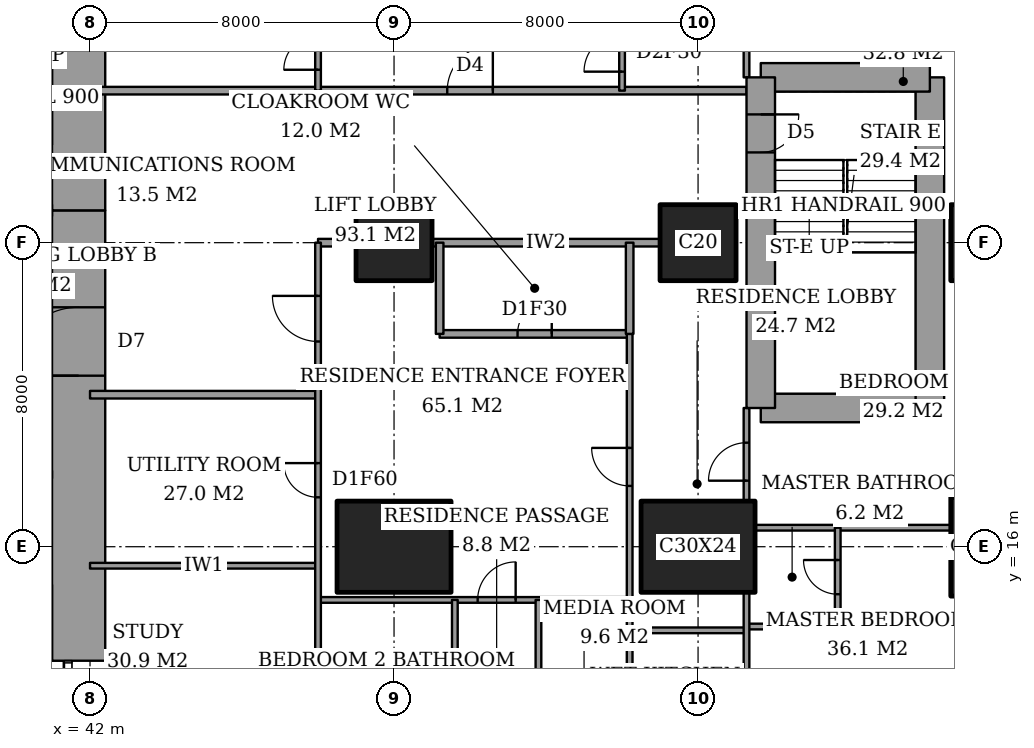
"""IFC4 building model, lengths in metres.
Left out: names, types, materials, properties, quantities, classifications, styles, units other than length and angle.
Written with IfcOpenShell. Run it as: python <this file> out.ifc"""

import sys

from ifc_helpers import new_model, si_unit, direction, frame, frame_2d, origin, origin_2d, place, context, subcontext, project, spatial, rectangle, extrude, element, fill, save


model = new_model("IFC4")
c1 = context("Model", 3, precision=1e-05, world=origin(), true_north=direction((0.0, 1.0)))
c2 = subcontext(c1, "Body", "Model", "MODEL_VIEW")
j1 = project(units=[si_unit("LENGTHUNIT", "METRE"), si_unit("PLANEANGLEUNIT", "RADIAN")], contexts=[c1])
p1 = place(None, origin())
s1 = spatial("IfcSite", under=j1, at=p1, CompositionType="ELEMENT")
p2 = place(p1, origin())
s2 = spatial("IfcBuilding", under=s1, at=p2, CompositionType="ELEMENT")
p3 = place(p2, frame((0.0, 0.0, 114.2)))
s3 = spatial("IfcBuildingStorey", under=s2, at=p3, CompositionType="ELEMENT", Elevation=114.2)
p4 = place(p3, frame((50.0, 16.0, 0.0), z_axis=(0.0, 0.0, 1.0), x_axis=(1.0, 0.0, 0.0)))
e1 = element("IfcColumn", 1, at=p4, inside=s3, PredefinedType="COLUMN", context=c2, shape_type="SweptSolid", body=[
    extrude(rectangle(XDim=3.0, YDim=2.4, at=origin_2d()), origin(), (0.0, 0.0, 1.0), 3.6),
])
p5 = place(p3, frame((50.0, 24.0, 0.0), z_axis=(0.0, 0.0, 1.0), x_axis=(1.0, 0.0, 0.0)))
e2 = element("IfcColumn", 2, at=p5, inside=s3, PredefinedType="COLUMN", context=c2, shape_type="SweptSolid", body=[
    extrude(rectangle(XDim=2.0, YDim=2.0, at=origin_2d()), origin(), (0.0, 0.0, 1.0), 3.6),
])
p6 = place(p3, frame((58.0, 16.0, 0.0), z_axis=(0.0, 0.0, 1.0), x_axis=(1.0, 0.0, 0.0)))
e3 = element("IfcColumn", 3, at=p6, inside=s3, PredefinedType="COLUMN", context=c2, shape_type="SweptSolid", body=[
    extrude(rectangle(XDim=3.0, YDim=2.4, at=origin_2d()), origin(), (0.0, 0.0, 1.0), 3.6),
])
p7 = place(p3, frame((58.0, 24.0, 0.0), z_axis=(0.0, 0.0, 1.0), x_axis=(1.0, 0.0, 0.0)))
e4 = element("IfcColumn", 4, at=p7, inside=s3, PredefinedType="COLUMN", context=c2, shape_type="SweptSolid", body=[
    extrude(rectangle(XDim=2.0, YDim=2.0, at=origin_2d()), origin(), (0.0, 0.0, 1.0), 3.6),
])
p8 = place(p3, frame((65.65, 16.0, 0.0), z_axis=(0.0, 0.0, 1.0), x_axis=(0.0, 1.0, 0.0)))
e5 = element("IfcColumn", 5, at=p8, inside=s3, PredefinedType="COLUMN", context=c2, shape_type="SweptSolid", body=[
    extrude(rectangle(XDim=2.6, YDim=2.0, at=origin_2d()), origin(), (0.0, 0.0, 1.0), 3.6),
])
p9 = place(p3, frame((65.65, 24.0, 0.0), z_axis=(0.0, 0.0, 1.0), x_axis=(1.0, 0.0, 0.0)))
e6 = element("IfcColumn", 6, at=p9, inside=s3, PredefinedType="COLUMN", context=c2, shape_type="SweptSolid", body=[
    extrude(rectangle(XDim=2.0, YDim=2.0, at=origin_2d()), origin(), (0.0, 0.0, 1.0), 3.6),
])
p10 = place(p3, frame((41.7, 13.0, 0.0), z_axis=(0.0, 0.0, 1.0), x_axis=(0.0, 1.0, 0.0)))
e7 = element("IfcWall", 7, at=p10, inside=s3, PredefinedType="SHEAR", context=c2, shape_type="SweptSolid", body=[
    extrude(rectangle(XDim=11.85, YDim=1.4, at=frame_2d((5.925, 0.0))), origin(), (0.0, 0.0, 1.0), 3.6),
])
p11 = place(p10, frame((7.5, 0.0, 0.0)))
e8 = element("IfcOpeningElement", 8, at=p11, cuts=e7, PredefinedType="OPENING", context=c2, shape_type="SweptSolid", body=[
    extrude(rectangle(XDim=1.8, YDim=2.4, at=frame_2d((0.9, 1.2))), frame((0.0, 0.71, 0.0), z_axis=(0.0, -1.0, 0.0), x_axis=(1.0, 0.0, 0.0)), (0.0, 0.0, 1.0), 1.42),
])
p12 = place(p3, frame((41.7, 24.85, 0.0), z_axis=(0.0, 0.0, 1.0), x_axis=(0.0, 1.0, 0.0)))
e9 = element("IfcWall", 9, at=p12, inside=s3, PredefinedType="SHEAR", context=c2, shape_type="SweptSolid", body=[
    extrude(rectangle(XDim=10.15, YDim=1.4, at=frame_2d((5.075, 0.0))), origin(), (0.0, 0.0, 1.0), 3.6),
])
p13 = place(p3, frame((59.65, 19.65, 0.0), z_axis=(0.0, 0.0, 1.0), x_axis=(1.0, 0.0, 0.0)))
e10 = element("IfcWall", 10, at=p13, inside=s3, PredefinedType="SHEAR", context=c2, shape_type="SweptSolid", body=[
    extrude(rectangle(XDim=4.45, YDim=0.75, at=frame_2d((2.225, 0.0))), origin(), (0.0, 0.0, 1.0), 3.6),
])
p14 = place(p3, frame((64.1, 19.65, 0.0), z_axis=(0.0, 0.0, 1.0), x_axis=(0.0, 1.0, 0.0)))
e11 = element("IfcWall", 11, at=p14, inside=s3, PredefinedType="SHEAR", context=c2, shape_type="SweptSolid", body=[
    extrude(rectangle(XDim=8.7, YDim=0.75, at=frame_2d((4.35, 0.0))), origin(), (0.0, 0.0, 1.0), 3.6),
])
p15 = place(p3, frame((64.1, 28.35, 0.0), z_axis=(0.0, 0.0, 1.0), x_axis=(-1.0, 0.0, 0.0)))
e12 = element("IfcWall", 12, at=p15, inside=s3, PredefinedType="SHEAR", context=c2, shape_type="SweptSolid", body=[
    extrude(rectangle(XDim=4.45, YDim=0.75, at=frame_2d((2.225, 0.0))), origin(), (0.0, 0.0, 1.0), 3.6),
])
p16 = place(p3, frame((59.65, 28.35, 0.0), z_axis=(0.0, 0.0, 1.0), x_axis=(0.0, -1.0, 0.0)))
e13 = element("IfcWall", 13, at=p16, inside=s3, PredefinedType="SHEAR", context=c2, shape_type="SweptSolid", body=[
    extrude(rectangle(XDim=8.7, YDim=0.75, at=frame_2d((4.35, 0.0))), origin(), (0.0, 0.0, 1.0), 3.6),
])
p17 = place(p16, frame((0.975, 0.0, 0.0)))
e14 = element("IfcOpeningElement", 14, at=p17, cuts=e13, PredefinedType="OPENING", context=c2, shape_type="SweptSolid", body=[
    extrude(rectangle(XDim=1.0, YDim=2.1, at=frame_2d((0.5, 1.05))), frame((0.0, 0.385, 0.0), z_axis=(0.0, -1.0, 0.0), x_axis=(1.0, 0.0, 0.0)), (0.0, 0.0, 1.0), 0.77),
])
p18 = place(p3, frame((56.2, 13.8, 0.0), z_axis=(0.0, 0.0, 1.0), x_axis=(1.0, 0.0, 0.0)))
e15 = element("IfcWall", 15, at=p18, inside=s3, PredefinedType="PARTITIONING", context=c2, shape_type="SweptSolid", body=[
    extrude(rectangle(XDim=3.075, YDim=0.15, at=frame_2d((1.538, 0.0))), origin(), (0.0, 0.0, 1.0), 3.35),
])
p19 = place(p3, frame((59.275, 13.9, 0.0), z_axis=(0.0, 0.0, 1.0), x_axis=(1.0, 0.0, 0.0)))
e16 = element("IfcWall", 16, at=p19, inside=s3, PredefinedType="PARTITIONING", context=c2, shape_type="SweptSolid", body=[
    extrude(rectangle(XDim=2.4, YDim=0.15, at=frame_2d((1.2, 0.0))), origin(), (0.0, 0.0, 1.0), 3.35),
])
p20 = place(p3, frame((48.0, 14.6, 0.0), z_axis=(0.0, 0.0, 1.0), x_axis=(1.0, 0.0, 0.0)))
e17 = element("IfcWall", 17, at=p20, inside=s3, PredefinedType="PARTITIONING", context=c2, shape_type="SweptSolid", body=[
    extrude(rectangle(XDim=8.2, YDim=0.15, at=frame_2d((4.1, 0.0))), origin(), (0.0, 0.0, 1.0), 3.35),
])
p21 = place(p20, frame((4.2, 0.0, 0.0)))
e18 = element("IfcOpeningElement", 18, at=p21, cuts=e17, PredefinedType="OPENING", context=c2, shape_type="SweptSolid", body=[
    extrude(rectangle(XDim=1.0, YDim=2.1, at=frame_2d((0.5, 1.05))), frame((0.0, 0.085, 0.0), z_axis=(0.0, -1.0, 0.0), x_axis=(1.0, 0.0, 0.0)), (0.0, 0.0, 1.0), 0.17),
])
p22 = place(p3, frame((42.0, 15.5, 0.0), z_axis=(0.0, 0.0, 1.0), x_axis=(1.0, 0.0, 0.0)))
e19 = element("IfcWall", 19, at=p22, inside=s3, PredefinedType="PARTITIONING", context=c2, shape_type="SweptSolid", body=[
    extrude(rectangle(XDim=6.0, YDim=0.15, at=frame_2d((3.0, 0.0))), origin(), (0.0, 0.0, 1.0), 3.35),
])
p23 = place(p3, frame((59.5, 16.5, 0.0), z_axis=(0.0, 0.0, 1.0), x_axis=(1.0, 0.0, 0.0)))
e20 = element("IfcWall", 20, at=p23, inside=s3, PredefinedType="PARTITIONING", context=c2, shape_type="SweptSolid", body=[
    extrude(rectangle(XDim=5.15, YDim=0.15, at=frame_2d((2.575, 0.0))), origin(), (0.0, 0.0, 1.0), 3.35),
])
p24 = place(p3, frame((42.0, 20.0, 0.0), z_axis=(0.0, 0.0, 1.0), x_axis=(1.0, 0.0, 0.0)))
e21 = element("IfcWall", 21, at=p24, inside=s3, PredefinedType="PARTITIONING", context=c2, shape_type="SweptSolid", body=[
    extrude(rectangle(XDim=6.0, YDim=0.2, at=frame_2d((3.0, 0.0))), origin(), (0.0, 0.0, 1.0), 3.35),
])
p25 = place(p3, frame((51.2, 21.6, 0.0), z_axis=(0.0, 0.0, 1.0), x_axis=(1.0, 0.0, 0.0)))
e22 = element("IfcWall", 22, at=p25, inside=s3, PredefinedType="PARTITIONING", context=c2, shape_type="SweptSolid", body=[
    extrude(rectangle(XDim=5.0, YDim=0.2, at=frame_2d((2.5, 0.0))), origin(), (0.0, 0.0, 1.0), 3.35),
])
p26 = place(p25, frame((2.05, 0.0, 0.0)))
e23 = element("IfcOpeningElement", 23, at=p26, cuts=e22, PredefinedType="OPENING", context=c2, shape_type="SweptSolid", body=[
    extrude(rectangle(XDim=0.9, YDim=2.1, at=frame_2d((0.45, 1.05))), frame((0.0, 0.11, 0.0), z_axis=(0.0, -1.0, 0.0), x_axis=(1.0, 0.0, 0.0)), (0.0, 0.0, 1.0), 0.22),
])
p27 = place(p3, frame((48.0, 24.0, 0.0), z_axis=(0.0, 0.0, 1.0), x_axis=(1.0, 0.0, 0.0)))
e24 = element("IfcWall", 24, at=p27, inside=s3, PredefinedType="PARTITIONING", context=c2, shape_type="SweptSolid", body=[
    extrude(rectangle(XDim=1.0, YDim=0.2, at=frame_2d((0.5, 0.0))), origin(), (0.0, 0.0, 1.0), 3.35),
])
p28 = place(p3, frame((51.0, 24.0, 0.0), z_axis=(0.0, 0.0, 1.0), x_axis=(1.0, 0.0, 0.0)))
e25 = element("IfcWall", 25, at=p28, inside=s3, PredefinedType="PARTITIONING", context=c2, shape_type="SweptSolid", body=[
    extrude(rectangle(XDim=6.0, YDim=0.2, at=frame_2d((3.0, 0.0))), origin(), (0.0, 0.0, 1.0), 3.35),
])
p29 = place(p3, frame((42.0, 28.0, 0.0), z_axis=(0.0, 0.0, 1.0), x_axis=(1.0, 0.0, 0.0)))
e26 = element("IfcWall", 26, at=p29, inside=s3, PredefinedType="PARTITIONING", context=c2, shape_type="SweptSolid", body=[
    extrude(rectangle(XDim=17.275, YDim=0.2, at=frame_2d((8.637, 0.0))), origin(), (0.0, 0.0, 1.0), 3.35),
])
p30 = place(p29, frame((9.4, 0.0, 0.0)))
e27 = element("IfcOpeningElement", 27, at=p30, cuts=e26, PredefinedType="OPENING", context=c2, shape_type="SweptSolid", body=[
    extrude(rectangle(XDim=1.2, YDim=2.4, at=frame_2d((0.6, 1.2))), frame((0.0, 0.11, 0.0), z_axis=(0.0, -1.0, 0.0), x_axis=(1.0, 0.0, 0.0)), (0.0, 0.0, 1.0), 0.22),
])
p31 = place(p3, frame((48.0, 10.6, 0.0), z_axis=(0.0, 0.0, 1.0), x_axis=(0.0, 1.0, 0.0)))
e28 = element("IfcWall", 28, at=p31, inside=s3, PredefinedType="PARTITIONING", context=c2, shape_type="SweptSolid", body=[
    extrude(rectangle(XDim=13.4, YDim=0.15, at=frame_2d((6.7, 0.0))), origin(), (0.0, 0.0, 1.0), 3.35),
])
p32 = place(p31, frame((10.8, 0.0, 0.0)))
e29 = element("IfcOpeningElement", 29, at=p32, cuts=e28, PredefinedType="OPENING", context=c2, shape_type="SweptSolid", body=[
    extrude(rectangle(XDim=1.2, YDim=2.4, at=frame_2d((0.6, 1.2))), frame((0.0, 0.085, 0.0), z_axis=(0.0, -1.0, 0.0), x_axis=(1.0, 0.0, 0.0)), (0.0, 0.0, 1.0), 0.17),
])
p33 = place(p31, frame((6.7, 0.0, 0.0)))
e30 = element("IfcOpeningElement", 30, at=p33, cuts=e28, PredefinedType="OPENING", context=c2, shape_type="SweptSolid", body=[
    extrude(rectangle(XDim=0.9, YDim=2.1, at=frame_2d((0.45, 1.05))), frame((0.0, 0.085, 0.0), z_axis=(0.0, -1.0, 0.0), x_axis=(1.0, 0.0, 0.0)), (0.0, 0.0, 1.0), 0.17),
])
p34 = place(p3, frame((48.0, 28.0, 0.0), z_axis=(0.0, 0.0, 1.0), x_axis=(0.0, 1.0, 0.0)))
e31 = element("IfcWall", 31, at=p34, inside=s3, PredefinedType="PARTITIONING", context=c2, shape_type="SweptSolid", body=[
    extrude(rectangle(XDim=9.4, YDim=0.15, at=frame_2d((4.7, 0.0))), origin(), (0.0, 0.0, 1.0), 3.35),
])
p35 = place(p34, frame((0.55, 0.0, 0.0)))
e32 = element("IfcOpeningElement", 32, at=p35, cuts=e31, PredefinedType="OPENING", context=c2, shape_type="SweptSolid", body=[
    extrude(rectangle(XDim=0.9, YDim=2.1, at=frame_2d((0.45, 1.05))), frame((0.0, 0.085, 0.0), z_axis=(0.0, -1.0, 0.0), x_axis=(1.0, 0.0, 0.0)), (0.0, 0.0, 1.0), 0.17),
])
p36 = place(p3, frame((51.2, 21.6, 0.0), z_axis=(0.0, 0.0, 1.0), x_axis=(0.0, 1.0, 0.0)))
e33 = element("IfcWall", 33, at=p36, inside=s3, PredefinedType="PARTITIONING", context=c2, shape_type="SweptSolid", body=[
    extrude(rectangle(XDim=2.4, YDim=0.2, at=frame_2d((1.2, 0.0))), origin(), (0.0, 0.0, 1.0), 3.35),
])
for number, where, z_axis, x_axis in (
    (34, (51.6, 10.6, 0.0), (0.0, 0.0, 1.0), (0.0, 1.0, 0.0)),
    (35, (53.8, 10.6, 0.0), (0.0, 0.0, 1.0), (0.0, 1.0, 0.0)),
):
    element("IfcWall", number, at=place(p3, frame(where, z_axis=z_axis, x_axis=x_axis)), inside=s3, PredefinedType="PARTITIONING", context=c2, shape_type="SweptSolid", body=[
        extrude(rectangle(XDim=4.0, YDim=0.15, at=frame_2d((2.0, 0.0))), origin(), (0.0, 0.0, 1.0), 3.35),
    ])
p37 = place(p3, frame((56.0, 28.0, 0.0), z_axis=(0.0, 0.0, 1.0), x_axis=(0.0, 1.0, 0.0)))
e36 = element("IfcWall", 36, at=p37, inside=s3, PredefinedType="PARTITIONING", context=c2, shape_type="SweptSolid", body=[
    extrude(rectangle(XDim=9.4, YDim=0.15, at=frame_2d((4.7, 0.0))), origin(), (0.0, 0.0, 1.0), 3.35),
])
p38 = place(p37, frame((0.5, 0.0, 0.0)))
e37 = element("IfcOpeningElement", 37, at=p38, cuts=e36, PredefinedType="OPENING", context=c2, shape_type="SweptSolid", body=[
    extrude(rectangle(XDim=1.0, YDim=2.1, at=frame_2d((0.5, 1.05))), frame((0.0, 0.085, 0.0), z_axis=(0.0, -1.0, 0.0), x_axis=(1.0, 0.0, 0.0)), (0.0, 0.0, 1.0), 0.17),
])
p39 = place(p3, frame((56.2, 21.6, 0.0), z_axis=(0.0, 0.0, 1.0), x_axis=(0.0, 1.0, 0.0)))
e38 = element("IfcWall", 38, at=p39, inside=s3, PredefinedType="PARTITIONING", context=c2, shape_type="SweptSolid", body=[
    extrude(rectangle(XDim=2.4, YDim=0.2, at=frame_2d((1.2, 0.0))), origin(), (0.0, 0.0, 1.0), 3.35),
])
p40 = place(p3, frame((56.2, 10.6, 0.0), z_axis=(0.0, 0.0, 1.0), x_axis=(0.0, 1.0, 0.0)))
e39 = element("IfcWall", 39, at=p40, inside=s3, PredefinedType="PARTITIONING", context=c2, shape_type="SweptSolid", body=[
    extrude(rectangle(XDim=11.0, YDim=0.15, at=frame_2d((5.5, 0.0))), origin(), (0.0, 0.0, 1.0), 3.35),
])
p41 = place(p40, frame((7.0, 0.0, 0.0)))
e40 = element("IfcOpeningElement", 40, at=p41, cuts=e39, PredefinedType="OPENING", context=c2, shape_type="SweptSolid", body=[
    extrude(rectangle(XDim=1.0, YDim=2.1, at=frame_2d((0.5, 1.05))), frame((0.0, 0.085, 0.0), z_axis=(0.0, -1.0, 0.0), x_axis=(1.0, 0.0, 0.0)), (0.0, 0.0, 1.0), 0.17),
])
p42 = place(p3, frame((59.275, 10.6, 0.0), z_axis=(0.0, 0.0, 1.0), x_axis=(0.0, 1.0, 0.0)))
e41 = element("IfcWall", 41, at=p42, inside=s3, PredefinedType="PARTITIONING", context=c2, shape_type="SweptSolid", body=[
    extrude(rectangle(XDim=4.2, YDim=0.15, at=frame_2d((2.1, 0.0))), origin(), (0.0, 0.0, 1.0), 3.35),
])
p43 = place(p3, frame((59.275, 17.2, 0.0), z_axis=(0.0, 0.0, 1.0), x_axis=(0.0, 1.0, 0.0)))
e42 = element("IfcWall", 42, at=p43, inside=s3, PredefinedType="PARTITIONING", context=c2, shape_type="SweptSolid", body=[
    extrude(rectangle(XDim=2.45, YDim=0.15, at=frame_2d((1.225, 0.0))), origin(), (0.0, 0.0, 1.0), 3.35),
])
p44 = place(p43, frame((0.538, 0.0, 0.0)))
e43 = element("IfcOpeningElement", 43, at=p44, cuts=e42, PredefinedType="OPENING", context=c2, shape_type="SweptSolid", body=[
    extrude(rectangle(XDim=1.0, YDim=2.1, at=frame_2d((0.5, 1.05))), frame((0.0, 0.085, 0.0), z_axis=(0.0, -1.0, 0.0), x_axis=(1.0, 0.0, 0.0)), (0.0, 0.0, 1.0), 0.17),
])
p45 = place(p3, frame((59.275, 28.35, 0.0), z_axis=(0.0, 0.0, 1.0), x_axis=(0.0, 1.0, 0.0)))
e44 = element("IfcWall", 44, at=p45, inside=s3, PredefinedType="PARTITIONING", context=c2, shape_type="SweptSolid", body=[
    extrude(rectangle(XDim=2.45, YDim=0.15, at=frame_2d((1.225, 0.0))), origin(), (0.0, 0.0, 1.0), 3.35),
])
p46 = place(p45, frame((0.913, 0.0, 0.0)))
e45 = element("IfcOpeningElement", 45, at=p46, cuts=e44, PredefinedType="OPENING", context=c2, shape_type="SweptSolid", body=[
    extrude(rectangle(XDim=1.0, YDim=2.1, at=frame_2d((0.5, 1.05))), frame((0.0, 0.085, 0.0), z_axis=(0.0, -1.0, 0.0), x_axis=(1.0, 0.0, 0.0)), (0.0, 0.0, 1.0), 0.17),
])
p47 = place(p3, frame((61.675, 13.9, 0.0), z_axis=(0.0, 0.0, 1.0), x_axis=(0.0, 1.0, 0.0)))
e46 = element("IfcWall", 46, at=p47, inside=s3, PredefinedType="PARTITIONING", context=c2, shape_type="SweptSolid", body=[
    extrude(rectangle(XDim=2.6, YDim=0.15, at=frame_2d((1.3, 0.0))), origin(), (0.0, 0.0, 1.0), 3.35),
])
p48 = place(p47, frame((0.85, 0.0, 0.0)))
e47 = element("IfcOpeningElement", 47, at=p48, cuts=e46, PredefinedType="OPENING", context=c2, shape_type="SweptSolid", body=[
    extrude(rectangle(XDim=0.9, YDim=2.1, at=frame_2d((0.45, 1.05))), frame((0.0, 0.085, 0.0), z_axis=(0.0, -1.0, 0.0), x_axis=(1.0, 0.0, 0.0)), (0.0, 0.0, 1.0), 0.17),
])
p49 = place(p3, frame((28.3, 17.9, 0.0), z_axis=(0.0, 0.0, 1.0), x_axis=(1.0, 0.0, 0.0)))
e48 = element("IfcWall", 48, at=p49, inside=s3, PredefinedType="PARTITIONING", context=c2, shape_type="SweptSolid", body=[
    extrude(rectangle(XDim=12.7, YDim=0.2, at=frame_2d((6.35, 0.0))), origin(), (0.0, 0.0, 1.0), 3.6),
])
p50 = place(p49, frame((0.95, 0.0, 0.0)))
e49 = element("IfcOpeningElement", 49, at=p50, cuts=e48, PredefinedType="OPENING", context=c2, shape_type="SweptSolid", body=[
    extrude(rectangle(XDim=1.1, YDim=2.1, at=frame_2d((0.55, 1.05))), frame((0.0, 0.11, 0.0), z_axis=(0.0, -1.0, 0.0), x_axis=(1.0, 0.0, 0.0)), (0.0, 0.0, 1.0), 0.22),
])
p51 = place(p49, frame((4.15, 0.0, 0.0)))
e50 = element("IfcOpeningElement", 50, at=p51, cuts=e48, PredefinedType="OPENING", context=c2, shape_type="SweptSolid", body=[
    extrude(rectangle(XDim=1.1, YDim=2.1, at=frame_2d((0.55, 1.05))), frame((0.0, 0.11, 0.0), z_axis=(0.0, -1.0, 0.0), x_axis=(1.0, 0.0, 0.0)), (0.0, 0.0, 1.0), 0.22),
])
p52 = place(p49, frame((7.35, 0.0, 0.0)))
e51 = element("IfcOpeningElement", 51, at=p52, cuts=e48, PredefinedType="OPENING", context=c2, shape_type="SweptSolid", body=[
    extrude(rectangle(XDim=1.1, YDim=2.1, at=frame_2d((0.55, 1.05))), frame((0.0, 0.11, 0.0), z_axis=(0.0, -1.0, 0.0), x_axis=(1.0, 0.0, 0.0)), (0.0, 0.0, 1.0), 0.22),
])
p53 = place(p49, frame((10.6, 0.0, 0.0)))
e52 = element("IfcOpeningElement", 52, at=p53, cuts=e48, PredefinedType="OPENING", context=c2, shape_type="SweptSolid", body=[
    extrude(rectangle(XDim=1.2, YDim=2.1, at=frame_2d((0.6, 1.05))), frame((0.0, 0.11, 0.0), z_axis=(0.0, -1.0, 0.0), x_axis=(1.0, 0.0, 0.0)), (0.0, 0.0, 1.0), 0.22),
])
p54 = place(p48, origin())
e53 = element("IfcDoor", 53, at=p54, inside=s3, OperationType="SINGLE_SWING_LEFT", PredefinedType="DOOR", context=c2, shape_type="SweptSolid", body=[
    extrude(rectangle(XDim=0.9, YDim=2.1, at=frame_2d((0.45, 1.05))), frame((0.0, 0.025, 0.0), z_axis=(0.0, -1.0, 0.0), x_axis=(1.0, 0.0, 0.0)), (0.0, 0.0, 1.0), 0.05),
])
fill(e47, e53)
p55 = place(p44, origin())
e54 = element("IfcDoor", 54, at=p55, inside=s3, OperationType="SINGLE_SWING_RIGHT", PredefinedType="DOOR", context=c2, shape_type="SweptSolid", body=[
    extrude(rectangle(XDim=1.0, YDim=2.1, at=frame_2d((0.5, 1.05))), frame((0.0, 0.025, 0.0), z_axis=(0.0, -1.0, 0.0), x_axis=(1.0, 0.0, 0.0)), (0.0, 0.0, 1.0), 0.05),
])
fill(e43, e54)
p56 = place(p41, origin())
e55 = element("IfcDoor", 55, at=p56, inside=s3, OperationType="SINGLE_SWING_LEFT", PredefinedType="DOOR", context=c2, shape_type="SweptSolid", body=[
    extrude(rectangle(XDim=1.0, YDim=2.1, at=frame_2d((0.5, 1.05))), frame((0.0, 0.025, 0.0), z_axis=(0.0, -1.0, 0.0), x_axis=(1.0, 0.0, 0.0)), (0.0, 0.0, 1.0), 0.05),
])
fill(e40, e55)
p57 = place(p26, origin())
e56 = element("IfcDoor", 56, at=p57, inside=s3, OperationType="SINGLE_SWING_LEFT", PredefinedType="DOOR", context=c2, shape_type="SweptSolid", body=[
    extrude(rectangle(XDim=0.9, YDim=2.1, at=frame_2d((0.45, 1.05))), frame((0.0, 0.025, 0.0), z_axis=(0.0, -1.0, 0.0), x_axis=(1.0, 0.0, 0.0)), (0.0, 0.0, 1.0), 0.05),
])
fill(e23, e56)
p58 = place(p32, origin())
e57 = element("IfcDoor", 57, at=p58, inside=s3, OperationType="SINGLE_SWING_LEFT", PredefinedType="DOOR", context=c2, shape_type="SweptSolid", body=[
    extrude(rectangle(XDim=1.2, YDim=2.4, at=frame_2d((0.6, 1.2))), frame((0.0, 0.025, 0.0), z_axis=(0.0, -1.0, 0.0), x_axis=(1.0, 0.0, 0.0)), (0.0, 0.0, 1.0), 0.05),
])
fill(e29, e57)
p59 = place(p21, origin())
e58 = element("IfcDoor", 58, at=p59, inside=s3, OperationType="SINGLE_SWING_LEFT", PredefinedType="DOOR", context=c2, shape_type="SweptSolid", body=[
    extrude(rectangle(XDim=1.0, YDim=2.1, at=frame_2d((0.5, 1.05))), frame((0.0, 0.025, 0.0), z_axis=(0.0, -1.0, 0.0), x_axis=(1.0, 0.0, 0.0)), (0.0, 0.0, 1.0), 0.05),
])
fill(e18, e58)
p60 = place(p33, origin())
e59 = element("IfcDoor", 59, at=p60, inside=s3, OperationType="SINGLE_SWING_LEFT", PredefinedType="DOOR", context=c2, shape_type="SweptSolid", body=[
    extrude(rectangle(XDim=0.9, YDim=2.1, at=frame_2d((0.45, 1.05))), frame((0.0, 0.025, 0.0), z_axis=(0.0, -1.0, 0.0), x_axis=(1.0, 0.0, 0.0)), (0.0, 0.0, 1.0), 0.05),
])
fill(e30, e59)
p61 = place(p38, origin())
e60 = element("IfcDoor", 60, at=p61, inside=s3, OperationType="SINGLE_SWING_RIGHT", PredefinedType="DOOR", context=c2, shape_type="SweptSolid", body=[
    extrude(rectangle(XDim=1.0, YDim=2.1, at=frame_2d((0.5, 1.05))), frame((0.0, 0.025, 0.0), z_axis=(0.0, -1.0, 0.0), x_axis=(1.0, 0.0, 0.0)), (0.0, 0.0, 1.0), 0.05),
])
fill(e37, e60)
p62 = place(p30, origin())
e61 = element("IfcDoor", 61, at=p62, inside=s3, OperationType="SINGLE_SWING_LEFT", PredefinedType="DOOR", context=c2, shape_type="SweptSolid", body=[
    extrude(rectangle(XDim=1.2, YDim=2.4, at=frame_2d((0.6, 1.2))), frame((0.0, 0.025, 0.0), z_axis=(0.0, -1.0, 0.0), x_axis=(1.0, 0.0, 0.0)), (0.0, 0.0, 1.0), 0.05),
])
fill(e27, e61)
p63 = place(p35, origin())
e62 = element("IfcDoor", 62, at=p63, inside=s3, OperationType="SINGLE_SWING_RIGHT", PredefinedType="DOOR", context=c2, shape_type="SweptSolid", body=[
    extrude(rectangle(XDim=0.9, YDim=2.1, at=frame_2d((0.45, 1.05))), frame((0.0, 0.025, 0.0), z_axis=(0.0, -1.0, 0.0), x_axis=(1.0, 0.0, 0.0)), (0.0, 0.0, 1.0), 0.05),
])
fill(e32, e62)
p64 = place(p11, origin())
e63 = element("IfcDoor", 63, at=p64, inside=s3, OperationType="DOUBLE_DOOR_DOUBLE_SWING", PredefinedType="DOOR", context=c2, shape_type="SweptSolid", body=[
    extrude(rectangle(XDim=1.8, YDim=2.4, at=frame_2d((0.9, 1.2))), frame((0.0, 0.025, 0.0), z_axis=(0.0, -1.0, 0.0), x_axis=(1.0, 0.0, 0.0)), (0.0, 0.0, 1.0), 0.05),
])
fill(e8, e63)
p65 = place(p17, origin())
e64 = element("IfcDoor", 64, at=p65, inside=s3, OperationType="SINGLE_SWING_RIGHT", PredefinedType="DOOR", context=c2, shape_type="SweptSolid", body=[
    extrude(rectangle(XDim=1.0, YDim=2.1, at=frame_2d((0.5, 1.05))), frame((0.0, 0.025, 0.0), z_axis=(0.0, -1.0, 0.0), x_axis=(1.0, 0.0, 0.0)), (0.0, 0.0, 1.0), 0.05),
])
fill(e14, e64)
save(model, sys.argv[1])
